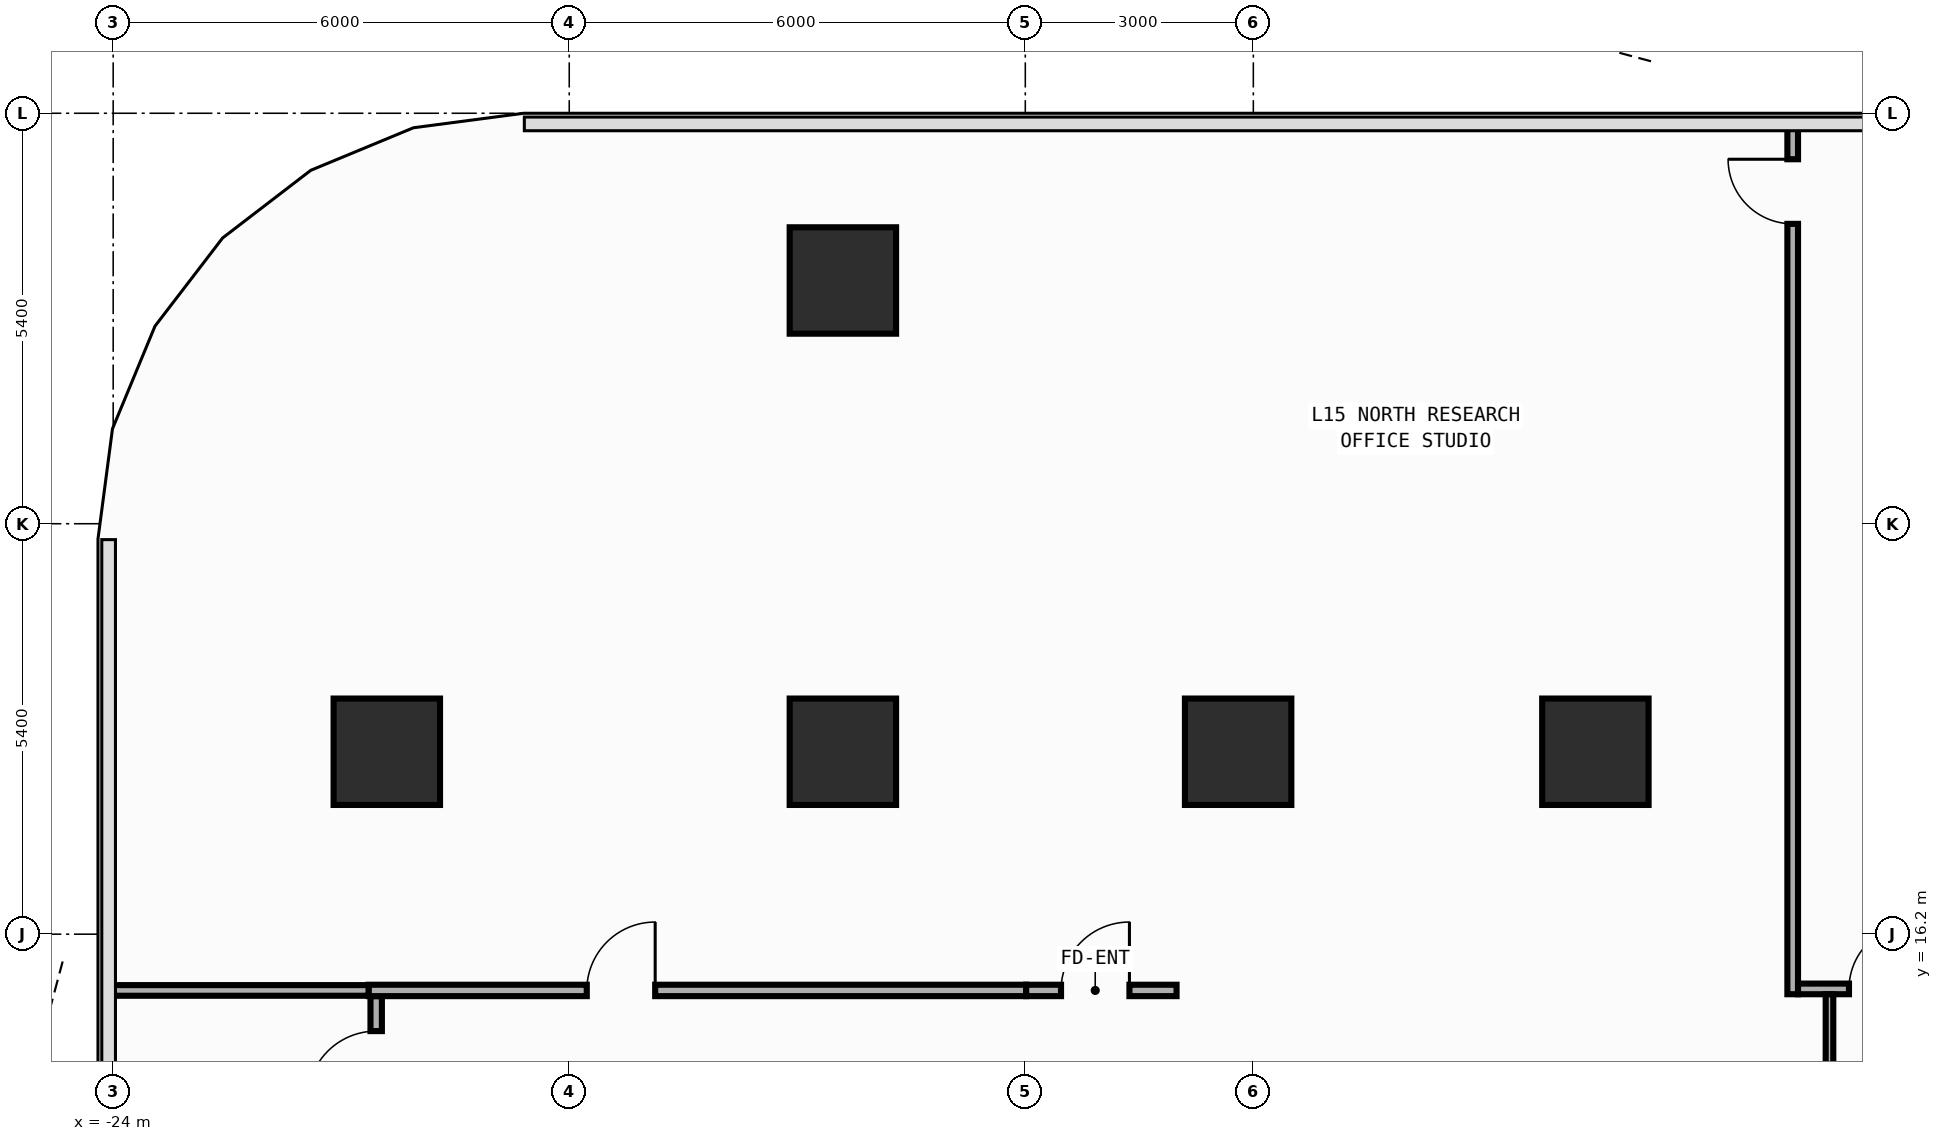
"""IFC4 building model, lengths in metres.
Left out: names, types, materials, properties, quantities, classifications, styles, units other than length and angle.
Written with IfcOpenShell. Run it as: python <this file> out.ifc"""

import sys

from ifc_helpers import new_model, si_unit, direction, frame, frame_2d, origin, origin_2d, place, context, subcontext, project, spatial, rectangle, extrude, element, fill, save


model = new_model("IFC4")
c1 = context("Model", 3, precision=1e-05, world=origin(), true_north=direction((0.0, 1.0)))
c2 = subcontext(c1, "Body", "Model", "MODEL_VIEW")
j1 = project(units=[si_unit("LENGTHUNIT", "METRE"), si_unit("PLANEANGLEUNIT", "RADIAN")], contexts=[c1])
p1 = place(None, origin())
s1 = spatial("IfcSite", under=j1, at=p1, CompositionType="ELEMENT")
p2 = place(p1, origin())
s2 = spatial("IfcBuilding", under=s1, at=p2, CompositionType="ELEMENT")
p3 = place(p2, frame((0.0, 0.0, 63.8)))
s3 = spatial("IfcBuildingStorey", under=s2, at=p3, CompositionType="ELEMENT", Elevation=63.8)
for number, where, z_axis, x_axis in (
    (1, (-9.2, 18.6, 0.0), (0.0, 0.0, 1.0), (1.0, 0.0, 0.0)),
    (2, (-20.4, 18.6, 0.0), (0.0, 0.0, 1.0), (1.0, 0.0, 0.0)),
    (3, (-14.4, 18.6, 0.0), (0.0, 0.0, 1.0), (1.0, 0.0, 0.0)),
    (4, (-4.5, 18.6, 0.0), (0.0, 0.0, 1.0), (1.0, 0.0, 0.0)),
    (5, (-14.4, 24.8, 0.0), (0.0, 0.0, 1.0), (1.0, 0.0, 0.0)),
):
    element("IfcColumn", number, at=place(p3, frame(where, z_axis=z_axis, x_axis=x_axis)), inside=s3, PredefinedType="COLUMN", context=c2, shape_type="SweptSolid", body=[
        extrude(rectangle(XDim=1.4, YDim=1.4, at=origin_2d()), origin(), (0.0, 0.0, 1.0), 4.2),
    ])
p4 = place(p3, frame((-11.99, 15.46, 0.0), z_axis=(0.0, 0.0, 1.0), x_axis=(1.0, 0.0, 0.0)))
e6 = element("IfcWall", 6, at=p4, inside=s3, PredefinedType="PARTITIONING", context=c2, shape_type="SweptSolid", body=[
    extrude(rectangle(XDim=1.98, YDim=0.15, at=frame_2d((0.99, 0.0))), origin(), (0.0, 0.0, 1.0), 3.94),
])
p5 = place(p4, frame((0.46, 0.0, 0.0)))
e7 = element("IfcOpeningElement", 7, at=p5, cuts=e6, PredefinedType="OPENING", context=c2, shape_type="SweptSolid", body=[
    extrude(rectangle(XDim=0.9, YDim=2.15, at=frame_2d((0.45, 1.075))), frame((0.0, 0.085, 0.0), z_axis=(0.0, -1.0, 0.0), x_axis=(1.0, 0.0, 0.0)), (0.0, 0.0, 1.0), 0.17),
])
p6 = place(p3, frame((-20.54, 13.36, 0.0), z_axis=(0.0, 0.0, 1.0), x_axis=(0.0, 1.0, 0.0)))
e8 = element("IfcWall", 8, at=p6, inside=s3, PredefinedType="PARTITIONING", context=c2, shape_type="SweptSolid", body=[
    extrude(rectangle(XDim=2.025, YDim=0.15, at=frame_2d((1.012, 0.0))), origin(), (0.0, 0.0, 1.0), 3.94),
])
p7 = place(p6, frame((0.665, 0.0, 0.0)))
e9 = element("IfcOpeningElement", 9, at=p7, cuts=e8, PredefinedType="OPENING", context=c2, shape_type="SweptSolid", body=[
    extrude(rectangle(XDim=0.9, YDim=2.15, at=frame_2d((0.45, 1.075))), frame((0.0, 0.085, 0.0), z_axis=(0.0, -1.0, 0.0), x_axis=(1.0, 0.0, 0.0)), (0.0, 0.0, 1.0), 0.17),
])
p8 = place(p3, frame((-20.64, 15.46, 0.0), z_axis=(0.0, 0.0, 1.0), x_axis=(1.0, 0.0, 0.0)))
e10 = element("IfcWall", 10, at=p8, inside=s3, PredefinedType="PARTITIONING", context=c2, shape_type="SweptSolid", body=[
    extrude(rectangle(XDim=8.65, YDim=0.15, at=frame_2d((4.325, 0.0))), origin(), (0.0, 0.0, 1.0), 3.94),
])
p9 = place(p8, frame((2.871, 0.0, 0.0)))
e11 = element("IfcOpeningElement", 11, at=p9, cuts=e10, PredefinedType="OPENING", context=c2, shape_type="SweptSolid", body=[
    extrude(rectangle(XDim=0.9, YDim=2.15, at=frame_2d((0.45, 1.075))), frame((0.0, 0.085, 0.0), z_axis=(0.0, -1.0, 0.0), x_axis=(1.0, 0.0, 0.0)), (0.0, 0.0, 1.0), 0.17),
])
p10 = place(p3, frame((-24.055, 15.46, 0.0), z_axis=(0.0, 0.0, 1.0), x_axis=(1.0, 0.0, 0.0)))
e12 = element("IfcWall", 12, at=p10, inside=s3, PredefinedType="PARTITIONING", context=c2, shape_type="SweptSolid", body=[
    extrude(rectangle(XDim=3.415, YDim=0.14, at=frame_2d((1.708, 0.0))), origin(), (0.0, 0.0, 1.0), 3.94),
])
p11 = place(p3, frame((-1.904, 15.41, 0.0), z_axis=(0.0, 0.0, 1.0), x_axis=(0.0, 1.0, 0.0)))
e13 = element("IfcWall", 13, at=p11, inside=s3, PredefinedType="PARTITIONING", context=c2, shape_type="SweptSolid", body=[
    extrude(rectangle(XDim=11.445, YDim=0.14, at=frame_2d((5.723, 0.0))), origin(), (0.0, 0.0, 1.0), 3.94),
])
p12 = place(p11, frame((10.135, 0.0, 0.0)))
e14 = element("IfcOpeningElement", 14, at=p12, cuts=e13, PredefinedType="OPENING", context=c2, shape_type="SweptSolid", body=[
    extrude(rectangle(XDim=0.85, YDim=2.1, at=frame_2d((0.425, 1.05))), frame((0.0, 0.08, 0.0), z_axis=(0.0, -1.0, 0.0), x_axis=(1.0, 0.0, 0.0)), (0.0, 0.0, 1.0), 0.16),
])
p13 = place(p3, frame((-1.834, 15.48, 0.0), z_axis=(0.0, 0.0, 1.0), x_axis=(1.0, 0.0, 0.0)))
e15 = element("IfcWall", 15, at=p13, inside=s3, PredefinedType="PARTITIONING", context=c2, shape_type="SweptSolid", body=[
    extrude(rectangle(XDim=3.454, YDim=0.14, at=frame_2d((1.727, 0.0))), origin(), (0.0, 0.0, 1.0), 3.94),
])
p14 = place(p13, frame((0.67, 0.0, 0.0)))
e16 = element("IfcOpeningElement", 16, at=p14, cuts=e15, PredefinedType="OPENING", context=c2, shape_type="SweptSolid", body=[
    extrude(rectangle(XDim=0.85, YDim=2.1, at=frame_2d((0.425, 1.05))), frame((0.0, 0.08, 0.0), z_axis=(0.0, -1.0, 0.0), x_axis=(1.0, 0.0, 0.0)), (0.0, 0.0, 1.0), 0.16),
])
p15 = place(p3, frame((-1.42, 9.15, 0.0), z_axis=(0.0, 0.0, 1.0), x_axis=(0.0, 1.0, 0.0)))
e17 = element("IfcWall", 17, at=p15, inside=s3, PredefinedType="PARTITIONING", context=c2, shape_type="SweptSolid", body=[
    extrude(rectangle(XDim=6.26, YDim=0.1, at=frame_2d((3.13, 0.0))), origin(), (0.0, 0.0, 1.0), 3.94),
])
p16 = place(p5, origin())
e18 = element("IfcDoor", 18, at=p16, inside=s3, OperationType="SINGLE_SWING_RIGHT", PredefinedType="DOOR", context=c2, shape_type="SweptSolid", body=[
    extrude(rectangle(XDim=0.9, YDim=2.15, at=frame_2d((0.45, 1.075))), frame((0.0, 0.025, 0.0), z_axis=(0.0, -1.0, 0.0), x_axis=(1.0, 0.0, 0.0)), (0.0, 0.0, 1.0), 0.05),
])
fill(e7, e18)
p17 = place(p7, origin())
e19 = element("IfcDoor", 19, at=p17, inside=s3, OperationType="SINGLE_SWING_LEFT", PredefinedType="DOOR", context=c2, shape_type="SweptSolid", body=[
    extrude(rectangle(XDim=0.9, YDim=2.15, at=frame_2d((0.45, 1.075))), frame((0.0, 0.025, 0.0), z_axis=(0.0, -1.0, 0.0), x_axis=(1.0, 0.0, 0.0)), (0.0, 0.0, 1.0), 0.05),
])
fill(e9, e19)
p18 = place(p9, origin())
e20 = element("IfcDoor", 20, at=p18, inside=s3, OperationType="SINGLE_SWING_RIGHT", PredefinedType="DOOR", context=c2, shape_type="SweptSolid", body=[
    extrude(rectangle(XDim=0.9, YDim=2.15, at=frame_2d((0.45, 1.075))), frame((0.0, 0.025, 0.0), z_axis=(0.0, -1.0, 0.0), x_axis=(1.0, 0.0, 0.0)), (0.0, 0.0, 1.0), 0.05),
])
fill(e11, e20)
p19 = place(p12, origin())
e21 = element("IfcDoor", 21, at=p19, inside=s3, OperationType="SINGLE_SWING_RIGHT", PredefinedType="DOOR", context=c2, shape_type="SweptSolid", body=[
    extrude(rectangle(XDim=0.85, YDim=2.1, at=frame_2d((0.425, 1.05))), frame((0.0, 0.025, 0.0), z_axis=(0.0, -1.0, 0.0), x_axis=(1.0, 0.0, 0.0)), (0.0, 0.0, 1.0), 0.05),
])
fill(e14, e21)
p20 = place(p14, origin())
e22 = element("IfcDoor", 22, at=p20, inside=s3, OperationType="SINGLE_SWING_RIGHT", PredefinedType="DOOR", context=c2, shape_type="SweptSolid", body=[
    extrude(rectangle(XDim=0.85, YDim=2.1, at=frame_2d((0.425, 1.05))), frame((0.0, 0.025, 0.0), z_axis=(0.0, -1.0, 0.0), x_axis=(1.0, 0.0, 0.0)), (0.0, 0.0, 1.0), 0.05),
])
fill(e16, e22)
save(model, sys.argv[1])
